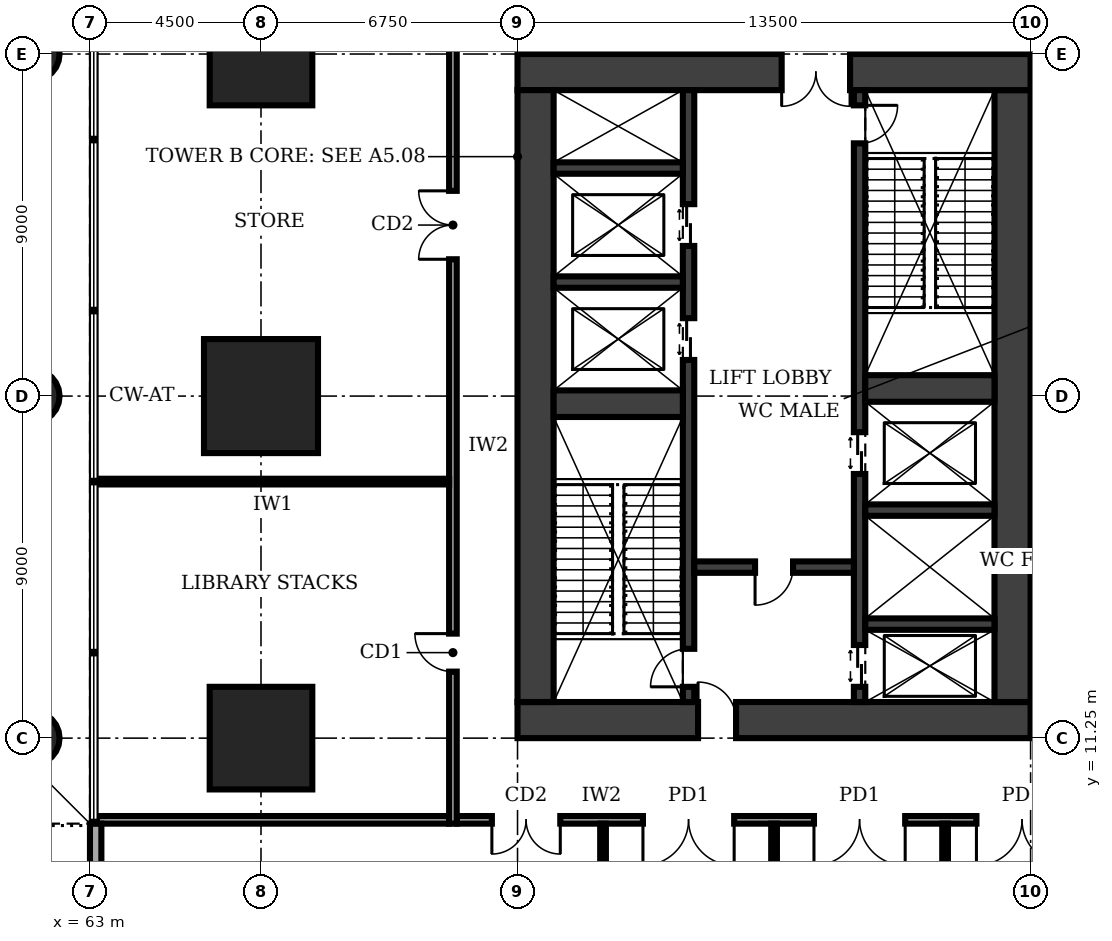
"""IFC4 building model, lengths in metres.
Left out: names, types, materials, properties, quantities, classifications, styles, units other than length and angle.
Written with IfcOpenShell. Run it as: python <this file> out.ifc"""

import sys

from ifc_helpers import new_model, si_unit, direction, frame, frame_2d, origin, origin_2d, place, context, subcontext, project, spatial, rectangle, circle, extrude, element, fill, save


model = new_model("IFC4")
c1 = context("Model", 3, precision=1e-05, world=origin(), true_north=direction((0.0, 1.0)))
c2 = subcontext(c1, "Body", "Model", "MODEL_VIEW")
j1 = project(units=[si_unit("LENGTHUNIT", "METRE"), si_unit("PLANEANGLEUNIT", "RADIAN")], contexts=[c1])
p1 = place(None, origin())
s1 = spatial("IfcSite", under=j1, at=p1, CompositionType="ELEMENT")
p2 = place(p1, origin())
s2 = spatial("IfcBuilding", under=s1, at=p2, CompositionType="ELEMENT")
p3 = place(p2, frame((0.0, 0.0, 16.0)))
s3 = spatial("IfcBuildingStorey", under=s2, at=p3, CompositionType="ELEMENT", Elevation=16.0)
p4 = place(p3, frame((74.25, 11.725, 0.0), z_axis=(0.0, 0.0, 1.0), x_axis=(1.0, 0.0, 0.0)))
e1 = element("IfcWall", 1, at=p4, inside=s3, PredefinedType="SHEAR", context=c2, shape_type="SweptSolid", body=[
    extrude(rectangle(XDim=13.5, YDim=0.95, at=frame_2d((6.75, 0.0))), origin(), (0.0, 0.0, 1.0), 5.0),
])
p5 = place(p4, frame((4.75, 0.0, 0.0)))
e2 = element("IfcOpeningElement", 2, at=p5, cuts=e1, PredefinedType="OPENING", context=c2, shape_type="SweptSolid", body=[
    extrude(rectangle(XDim=1.0, YDim=2.1, at=frame_2d((0.5, 1.05))), frame((0.0, 0.485, 0.0), z_axis=(0.0, -1.0, 0.0), x_axis=(1.0, 0.0, 0.0)), (0.0, 0.0, 1.0), 0.97),
])
p6 = place(p3, frame((87.275, 12.2, 0.0), z_axis=(0.0, 0.0, 1.0), x_axis=(0.0, 1.0, 0.0)))
e3 = element("IfcWall", 3, at=p6, inside=s3, PredefinedType="SHEAR", context=c2, shape_type="SweptSolid", body=[
    extrude(rectangle(XDim=16.1, YDim=0.95, at=frame_2d((8.05, 0.0))), origin(), (0.0, 0.0, 1.0), 5.0),
])
p7 = place(p3, frame((87.75, 28.775, 0.0), z_axis=(0.0, 0.0, 1.0), x_axis=(-1.0, 0.0, 0.0)))
e4 = element("IfcWall", 4, at=p7, inside=s3, PredefinedType="SHEAR", context=c2, shape_type="SweptSolid", body=[
    extrude(rectangle(XDim=13.5, YDim=0.95, at=frame_2d((6.75, 0.0))), origin(), (0.0, 0.0, 1.0), 5.0),
])
p8 = place(p7, frame((4.75, 0.0, 0.0)))
e5 = element("IfcOpeningElement", 5, at=p8, cuts=e4, PredefinedType="OPENING", context=c2, shape_type="SweptSolid", body=[
    extrude(rectangle(XDim=1.8, YDim=2.1, at=frame_2d((0.9, 1.05))), frame((0.0, 0.485, 0.0), z_axis=(0.0, -1.0, 0.0), x_axis=(1.0, 0.0, 0.0)), (0.0, 0.0, 1.0), 0.97),
])
p9 = place(p3, frame((74.725, 28.3, 0.0), z_axis=(0.0, 0.0, 1.0), x_axis=(0.0, -1.0, 0.0)))
e6 = element("IfcWall", 6, at=p9, inside=s3, PredefinedType="SHEAR", context=c2, shape_type="SweptSolid", body=[
    extrude(rectangle(XDim=16.1, YDim=0.95, at=frame_2d((8.05, 0.0))), origin(), (0.0, 0.0, 1.0), 5.0),
])
p10 = place(p3, frame((78.75, 12.2, 0.0), z_axis=(0.0, 0.0, 1.0), x_axis=(0.0, 1.0, 0.0)))
e7 = element("IfcWall", 7, at=p10, inside=s3, PredefinedType="SHEAR", context=c2, shape_type="SweptSolid", body=[
    extrude(rectangle(XDim=16.1, YDim=0.3, at=frame_2d((8.05, 0.0))), origin(), (0.0, 0.0, 1.0), 5.0),
])
p11 = place(p10, frame((0.4, 0.0, 0.0)))
e8 = element("IfcOpeningElement", 8, at=p11, cuts=e7, PredefinedType="OPENING", context=c2, shape_type="SweptSolid", body=[
    extrude(rectangle(XDim=1.0, YDim=2.1, at=frame_2d((0.5, 1.05))), frame((0.0, 0.16, 0.0), z_axis=(0.0, -1.0, 0.0), x_axis=(1.0, 0.0, 0.0)), (0.0, 0.0, 1.0), 0.32),
])
p12 = place(p10, frame((9.0, 0.0, 0.0)))
e9 = element("IfcOpeningElement", 9, at=p12, cuts=e7, PredefinedType="OPENING", context=c2, shape_type="SweptSolid", body=[
    extrude(rectangle(XDim=1.1, YDim=2.1, at=frame_2d((0.55, 1.05))), frame((0.0, 0.16, 0.0), z_axis=(0.0, -1.0, 0.0), x_axis=(1.0, 0.0, 0.0)), (0.0, 0.0, 1.0), 0.32),
])
p13 = place(p10, frame((12.0, 0.0, 0.0)))
e10 = element("IfcOpeningElement", 10, at=p13, cuts=e7, PredefinedType="OPENING", context=c2, shape_type="SweptSolid", body=[
    extrude(rectangle(XDim=1.1, YDim=2.1, at=frame_2d((0.55, 1.05))), frame((0.0, 0.16, 0.0), z_axis=(0.0, -1.0, 0.0), x_axis=(1.0, 0.0, 0.0)), (0.0, 0.0, 1.0), 0.32),
])
p14 = place(p3, frame((83.25, 12.2, 0.0), z_axis=(0.0, 0.0, 1.0), x_axis=(0.0, 1.0, 0.0)))
e11 = element("IfcWall", 11, at=p14, inside=s3, PredefinedType="SHEAR", context=c2, shape_type="SweptSolid", body=[
    extrude(rectangle(XDim=16.1, YDim=0.3, at=frame_2d((8.05, 0.0))), origin(), (0.0, 0.0, 1.0), 5.0),
])
p15 = place(p14, frame((14.7, 0.0, 0.0)))
e12 = element("IfcOpeningElement", 12, at=p15, cuts=e11, PredefinedType="OPENING", context=c2, shape_type="SweptSolid", body=[
    extrude(rectangle(XDim=1.0, YDim=2.1, at=frame_2d((0.5, 1.05))), frame((0.0, 0.16, 0.0), z_axis=(0.0, -1.0, 0.0), x_axis=(1.0, 0.0, 0.0)), (0.0, 0.0, 1.0), 0.32),
])
p16 = place(p14, frame((0.4, 0.0, 0.0)))
e13 = element("IfcOpeningElement", 13, at=p16, cuts=e11, PredefinedType="OPENING", context=c2, shape_type="SweptSolid", body=[
    extrude(rectangle(XDim=1.1, YDim=2.1, at=frame_2d((0.55, 1.05))), frame((0.0, 0.16, 0.0), z_axis=(0.0, -1.0, 0.0), x_axis=(1.0, 0.0, 0.0)), (0.0, 0.0, 1.0), 0.32),
])
p17 = place(p14, frame((6.0, 0.0, 0.0)))
e14 = element("IfcOpeningElement", 14, at=p17, cuts=e11, PredefinedType="OPENING", context=c2, shape_type="SweptSolid", body=[
    extrude(rectangle(XDim=1.1, YDim=2.1, at=frame_2d((0.55, 1.05))), frame((0.0, 0.16, 0.0), z_axis=(0.0, -1.0, 0.0), x_axis=(1.0, 0.0, 0.0)), (0.0, 0.0, 1.0), 0.32),
])
p18 = place(p3, frame((75.2, 20.05, 0.0), z_axis=(0.0, 0.0, 1.0), x_axis=(1.0, 0.0, 0.0)))
e15 = element("IfcWall", 15, at=p18, inside=s3, PredefinedType="SHEAR", context=c2, shape_type="SweptSolid", body=[
    extrude(rectangle(XDim=3.4, YDim=0.7, at=frame_2d((1.7, 0.0))), origin(), (0.0, 0.0, 1.0), 5.0),
])
p19 = place(p3, frame((78.9, 15.75, 0.0), z_axis=(0.0, 0.0, 1.0), x_axis=(1.0, 0.0, 0.0)))
e16 = element("IfcWall", 16, at=p19, inside=s3, PredefinedType="SHEAR", context=c2, shape_type="SweptSolid", body=[
    extrude(rectangle(XDim=4.2, YDim=0.3, at=frame_2d((2.1, 0.0))), origin(), (0.0, 0.0, 1.0), 5.0),
])
p20 = place(p19, frame((1.6, 0.0, 0.0)))
e17 = element("IfcOpeningElement", 17, at=p20, cuts=e16, PredefinedType="OPENING", context=c2, shape_type="SweptSolid", body=[
    extrude(rectangle(XDim=1.0, YDim=2.1, at=frame_2d((0.5, 1.05))), frame((0.0, 0.16, 0.0), z_axis=(0.0, -1.0, 0.0), x_axis=(1.0, 0.0, 0.0)), (0.0, 0.0, 1.0), 0.32),
])
for number, where, z_axis, x_axis in (
    (18, (83.4, 14.25, 0.0), (0.0, 0.0, 1.0), (1.0, 0.0, 0.0)),
    (19, (83.4, 17.25, 0.0), (0.0, 0.0, 1.0), (1.0, 0.0, 0.0)),
):
    element("IfcWall", number, at=place(p3, frame(where, z_axis=z_axis, x_axis=x_axis)), inside=s3, PredefinedType="SHEAR", context=c2, shape_type="SweptSolid", body=[
        extrude(rectangle(XDim=3.4, YDim=0.3, at=frame_2d((1.7, 0.0))), origin(), (0.0, 0.0, 1.0), 5.0),
    ])
p21 = place(p3, frame((83.4, 20.45, 0.0), z_axis=(0.0, 0.0, 1.0), x_axis=(1.0, 0.0, 0.0)))
e20 = element("IfcWall", 20, at=p21, inside=s3, PredefinedType="SHEAR", context=c2, shape_type="SweptSolid", body=[
    extrude(rectangle(XDim=3.4, YDim=0.7, at=frame_2d((1.7, 0.0))), origin(), (0.0, 0.0, 1.0), 5.0),
])
for number, where, z_axis, x_axis in (
    (21, (75.2, 23.25, 0.0), (0.0, 0.0, 1.0), (1.0, 0.0, 0.0)),
    (22, (75.2, 26.25, 0.0), (0.0, 0.0, 1.0), (1.0, 0.0, 0.0)),
):
    element("IfcWall", number, at=place(p3, frame(where, z_axis=z_axis, x_axis=x_axis)), inside=s3, PredefinedType="SHEAR", context=c2, shape_type="SweptSolid", body=[
        extrude(rectangle(XDim=3.4, YDim=0.3, at=frame_2d((1.7, 0.0))), origin(), (0.0, 0.0, 1.0), 5.0),
    ])
p22 = place(p3, frame((67.5, 11.25, 0.0), z_axis=(0.0, 0.0, 1.0), x_axis=(1.0, 0.0, 0.0)))
e23 = element("IfcColumn", 23, at=p22, inside=s3, PredefinedType="COLUMN", context=c2, shape_type="SweptSolid", body=[
    extrude(rectangle(XDim=2.7, YDim=2.7, at=origin_2d()), origin(), (0.0, 0.0, 1.0), 5.0),
])
p23 = place(p3, frame((67.5, 20.25, 0.0), z_axis=(0.0, 0.0, 1.0), x_axis=(1.0, 0.0, 0.0)))
e24 = element("IfcColumn", 24, at=p23, inside=s3, PredefinedType="COLUMN", context=c2, shape_type="SweptSolid", body=[
    extrude(rectangle(XDim=3.0, YDim=3.0, at=origin_2d()), origin(), (0.0, 0.0, 1.0), 5.0),
])
p24 = place(p3, frame((67.5, 29.25, 0.0), z_axis=(0.0, 0.0, 1.0), x_axis=(1.0, 0.0, 0.0)))
e25 = element("IfcColumn", 25, at=p24, inside=s3, PredefinedType="COLUMN", context=c2, shape_type="SweptSolid", body=[
    extrude(rectangle(XDim=2.7, YDim=2.7, at=origin_2d()), origin(), (0.0, 0.0, 1.0), 5.0),
])
for number, where, z_axis, x_axis in (
    (26, (61.5, 11.25, 0.0), (0.0, 0.0, 1.0), (1.0, 0.0, 0.0)),
    (27, (61.5, 20.25, 0.0), (0.0, 0.0, 1.0), (1.0, 0.0, 0.0)),
    (28, (61.5, 29.25, 0.0), (0.0, 0.0, 1.0), (1.0, 0.0, 0.0)),
):
    element("IfcColumn", number, at=place(p3, frame(where, z_axis=z_axis, x_axis=x_axis)), inside=s3, PredefinedType="COLUMN", context=c2, shape_type="SweptSolid", body=[
        extrude(circle(Radius=0.7, at=origin_2d()), origin(), (0.0, 0.0, 1.0), 5.0),
    ])
p25 = place(p3, frame((72.65, 9.1, 0.0), z_axis=(0.0, 0.0, 1.0), x_axis=(1.0, 0.0, 0.0)))
e29 = element("IfcWall", 29, at=p25, inside=s3, PredefinedType="SOLIDWALL", context=c2, shape_type="SweptSolid", body=[
    extrude(rectangle(XDim=16.9, YDim=0.2, at=frame_2d((8.45, 0.0))), origin(), (0.0, 0.0, 1.0), 4.7),
])
p26 = place(p25, frame((0.925, 0.0, 0.0)))
e30 = element("IfcOpeningElement", 30, at=p26, cuts=e29, PredefinedType="OPENING", context=c2, shape_type="SweptSolid", body=[
    extrude(rectangle(XDim=1.8, YDim=2.1, at=frame_2d((0.9, 1.05))), frame((0.0, 0.11, 0.0), z_axis=(0.0, -1.0, 0.0), x_axis=(1.0, 0.0, 0.0)), (0.0, 0.0, 1.0), 0.22),
])
p27 = place(p25, frame((4.9, 0.0, 0.0)))
e31 = element("IfcOpeningElement", 31, at=p27, cuts=e29, PredefinedType="OPENING", context=c2, shape_type="SweptSolid", body=[
    extrude(rectangle(XDim=2.4, YDim=2.7, at=frame_2d((1.2, 1.35))), frame((0.0, 0.11, 0.0), z_axis=(0.0, -1.0, 0.0), x_axis=(1.0, 0.0, 0.0)), (0.0, 0.0, 1.0), 0.22),
])
p28 = place(p25, frame((9.4, 0.0, 0.0)))
e32 = element("IfcOpeningElement", 32, at=p28, cuts=e29, PredefinedType="OPENING", context=c2, shape_type="SweptSolid", body=[
    extrude(rectangle(XDim=2.4, YDim=2.7, at=frame_2d((1.2, 1.35))), frame((0.0, 0.11, 0.0), z_axis=(0.0, -1.0, 0.0), x_axis=(1.0, 0.0, 0.0)), (0.0, 0.0, 1.0), 0.22),
])
p29 = place(p25, frame((13.675, 0.0, 0.0)))
e33 = element("IfcOpeningElement", 33, at=p29, cuts=e29, PredefinedType="OPENING", context=c2, shape_type="SweptSolid", body=[
    extrude(rectangle(XDim=2.4, YDim=2.7, at=frame_2d((1.2, 1.35))), frame((0.0, 0.11, 0.0), z_axis=(0.0, -1.0, 0.0), x_axis=(1.0, 0.0, 0.0)), (0.0, 0.0, 1.0), 0.22),
])
p30 = place(p3, frame((72.55, 31.3, 0.0), z_axis=(0.0, 0.0, 1.0), x_axis=(0.0, -1.0, 0.0)))
e34 = element("IfcWall", 34, at=p30, inside=s3, PredefinedType="SOLIDWALL", context=c2, shape_type="SweptSolid", body=[
    extrude(rectangle(XDim=22.3, YDim=0.2, at=frame_2d((11.15, 0.0))), origin(), (0.0, 0.0, 1.0), 4.7),
])
p31 = place(p30, frame((17.3, 0.0, 0.0)))
e35 = element("IfcOpeningElement", 35, at=p31, cuts=e34, PredefinedType="OPENING", context=c2, shape_type="SweptSolid", body=[
    extrude(rectangle(XDim=1.0, YDim=2.1, at=frame_2d((0.5, 1.05))), frame((0.0, 0.11, 0.0), z_axis=(0.0, -1.0, 0.0), x_axis=(1.0, 0.0, 0.0)), (0.0, 0.0, 1.0), 0.22),
])
p32 = place(p30, frame((5.65, 0.0, 0.0)))
e36 = element("IfcOpeningElement", 36, at=p32, cuts=e34, PredefinedType="OPENING", context=c2, shape_type="SweptSolid", body=[
    extrude(rectangle(XDim=1.8, YDim=2.1, at=frame_2d((0.9, 1.05))), frame((0.0, 0.11, 0.0), z_axis=(0.0, -1.0, 0.0), x_axis=(1.0, 0.0, 0.0)), (0.0, 0.0, 1.0), 0.22),
])
p33 = place(p3, frame((63.18, 9.1, 0.0), z_axis=(0.0, 0.0, 1.0), x_axis=(1.0, 0.0, 0.0)))
e37 = element("IfcWall", 37, at=p33, inside=s3, PredefinedType="SOLIDWALL", context=c2, shape_type="SweptSolid", body=[
    extrude(rectangle(XDim=9.27, YDim=0.2, at=frame_2d((4.635, 0.0))), origin(), (0.0, 0.0, 1.0), 4.7),
])
for number, where, z_axis, x_axis in (
    (38, (76.5, -4.2, 0.0), (0.0, 0.0, 1.0), (0.0, 1.0, 0.0)),
    (39, (81.0, -4.2, 0.0), (0.0, 0.0, 1.0), (0.0, 1.0, 0.0)),
    (40, (85.5, -4.2, 0.0), (0.0, 0.0, 1.0), (0.0, 1.0, 0.0)),
):
    element("IfcWall", number, at=place(p3, frame(where, z_axis=z_axis, x_axis=x_axis)), inside=s3, PredefinedType="PARTITIONING", context=c2, shape_type="SweptSolid", body=[
        extrude(rectangle(XDim=13.2, YDim=0.15, at=frame_2d((6.6, 0.0))), origin(), (0.0, 0.0, 1.0), 4.7),
    ])
p34 = place(p3, frame((63.18, 18.0, 0.0), z_axis=(0.0, 0.0, 1.0), x_axis=(1.0, 0.0, 0.0)))
e41 = element("IfcWall", 41, at=p34, inside=s3, PredefinedType="PARTITIONING", context=c2, shape_type="SweptSolid", body=[
    extrude(rectangle(XDim=9.27, YDim=0.15, at=frame_2d((4.635, 0.0))), origin(), (0.0, 0.0, 1.0), 4.7),
])
p35 = place(p3, frame((63.15, 4.97, 0.0), z_axis=(0.0, 0.0, 1.0), x_axis=(0.0, 1.0, 0.0)))
e42 = element("IfcWall", 42, at=p35, inside=s3, PredefinedType="SOLIDWALL", context=c2, shape_type="SweptSolid", body=[
    extrude(rectangle(XDim=4.03, YDim=0.3, at=frame_2d((2.015, 0.0))), origin(), (0.0, 0.0, 1.0), 4.7),
])
p36 = place(p5, origin())
e43 = element("IfcDoor", 43, at=p36, inside=s3, OperationType="SINGLE_SWING_LEFT", PredefinedType="DOOR", context=c2, shape_type="SweptSolid", body=[
    extrude(rectangle(XDim=1.0, YDim=2.1, at=frame_2d((0.5, 1.05))), frame((0.0, 0.025, 0.0), z_axis=(0.0, -1.0, 0.0), x_axis=(1.0, 0.0, 0.0)), (0.0, 0.0, 1.0), 0.05),
])
fill(e2, e43)
p37 = place(p8, origin())
e44 = element("IfcDoor", 44, at=p37, inside=s3, OperationType="DOUBLE_DOOR_SINGLE_SWING", PredefinedType="DOOR", context=c2, shape_type="SweptSolid", body=[
    extrude(rectangle(XDim=1.8, YDim=2.1, at=frame_2d((0.9, 1.05))), frame((0.0, 0.025, 0.0), z_axis=(0.0, -1.0, 0.0), x_axis=(1.0, 0.0, 0.0)), (0.0, 0.0, 1.0), 0.05),
])
fill(e5, e44)
p38 = place(p20, frame((1.0, 0.0, 0.0), z_axis=(0.0, 0.0, 1.0), x_axis=(-1.0, 0.0, 0.0)))
e45 = element("IfcDoor", 45, at=p38, inside=s3, OperationType="SINGLE_SWING_RIGHT", PredefinedType="DOOR", context=c2, shape_type="SweptSolid", body=[
    extrude(rectangle(XDim=1.0, YDim=2.1, at=frame_2d((0.5, 1.05))), frame((0.0, 0.025, 0.0), z_axis=(0.0, -1.0, 0.0), x_axis=(1.0, 0.0, 0.0)), (0.0, 0.0, 1.0), 0.05),
])
fill(e17, e45)
p39 = place(p11, origin())
e46 = element("IfcDoor", 46, at=p39, inside=s3, OperationType="SINGLE_SWING_LEFT", PredefinedType="DOOR", context=c2, shape_type="SweptSolid", body=[
    extrude(rectangle(XDim=1.0, YDim=2.1, at=frame_2d((0.5, 1.05))), frame((0.0, 0.025, 0.0), z_axis=(0.0, -1.0, 0.0), x_axis=(1.0, 0.0, 0.0)), (0.0, 0.0, 1.0), 0.05),
])
fill(e8, e46)
p40 = place(p15, frame((1.0, 0.0, 0.0), z_axis=(0.0, 0.0, 1.0), x_axis=(-1.0, 0.0, 0.0)))
e47 = element("IfcDoor", 47, at=p40, inside=s3, OperationType="SINGLE_SWING_LEFT", PredefinedType="DOOR", context=c2, shape_type="SweptSolid", body=[
    extrude(rectangle(XDim=1.0, YDim=2.1, at=frame_2d((0.5, 1.05))), frame((0.0, 0.025, 0.0), z_axis=(0.0, -1.0, 0.0), x_axis=(1.0, 0.0, 0.0)), (0.0, 0.0, 1.0), 0.05),
])
fill(e12, e47)
p41 = place(p16, origin())
e48 = element("IfcDoor", 48, at=p41, inside=s3, OperationType="DOUBLE_DOOR_SLIDING", PredefinedType="DOOR", context=c2, shape_type="SweptSolid", body=[
    extrude(rectangle(XDim=1.1, YDim=2.1, at=frame_2d((0.55, 1.05))), frame((0.0, 0.025, 0.0), z_axis=(0.0, -1.0, 0.0), x_axis=(1.0, 0.0, 0.0)), (0.0, 0.0, 1.0), 0.05),
])
fill(e13, e48)
p42 = place(p12, origin())
e49 = element("IfcDoor", 49, at=p42, inside=s3, OperationType="DOUBLE_DOOR_SLIDING", PredefinedType="DOOR", context=c2, shape_type="SweptSolid", body=[
    extrude(rectangle(XDim=1.1, YDim=2.1, at=frame_2d((0.55, 1.05))), frame((0.0, 0.025, 0.0), z_axis=(0.0, -1.0, 0.0), x_axis=(1.0, 0.0, 0.0)), (0.0, 0.0, 1.0), 0.05),
])
fill(e9, e49)
p43 = place(p13, origin())
e50 = element("IfcDoor", 50, at=p43, inside=s3, OperationType="DOUBLE_DOOR_SLIDING", PredefinedType="DOOR", context=c2, shape_type="SweptSolid", body=[
    extrude(rectangle(XDim=1.1, YDim=2.1, at=frame_2d((0.55, 1.05))), frame((0.0, 0.025, 0.0), z_axis=(0.0, -1.0, 0.0), x_axis=(1.0, 0.0, 0.0)), (0.0, 0.0, 1.0), 0.05),
])
fill(e10, e50)
p44 = place(p17, origin())
e51 = element("IfcDoor", 51, at=p44, inside=s3, OperationType="DOUBLE_DOOR_SLIDING", PredefinedType="DOOR", context=c2, shape_type="SweptSolid", body=[
    extrude(rectangle(XDim=1.1, YDim=2.1, at=frame_2d((0.55, 1.05))), frame((0.0, 0.025, 0.0), z_axis=(0.0, -1.0, 0.0), x_axis=(1.0, 0.0, 0.0)), (0.0, 0.0, 1.0), 0.05),
])
fill(e14, e51)
p45 = place(p26, frame((1.8, 0.0, 0.0), z_axis=(0.0, 0.0, 1.0), x_axis=(-1.0, 0.0, 0.0)))
e52 = element("IfcDoor", 52, at=p45, inside=s3, OperationType="DOUBLE_DOOR_SINGLE_SWING", PredefinedType="DOOR", context=c2, shape_type="SweptSolid", body=[
    extrude(rectangle(XDim=1.8, YDim=2.1, at=frame_2d((0.9, 1.05))), frame((0.0, 0.025, 0.0), z_axis=(0.0, -1.0, 0.0), x_axis=(1.0, 0.0, 0.0)), (0.0, 0.0, 1.0), 0.05),
])
fill(e30, e52)
p46 = place(p27, frame((2.4, 0.0, 0.0), z_axis=(0.0, 0.0, 1.0), x_axis=(-1.0, 0.0, 0.0)))
e53 = element("IfcDoor", 53, at=p46, inside=s3, OperationType="DOUBLE_DOOR_SINGLE_SWING", PredefinedType="DOOR", context=c2, shape_type="SweptSolid", body=[
    extrude(rectangle(XDim=2.4, YDim=2.7, at=frame_2d((1.2, 1.35))), frame((0.0, 0.025, 0.0), z_axis=(0.0, -1.0, 0.0), x_axis=(1.0, 0.0, 0.0)), (0.0, 0.0, 1.0), 0.05),
])
fill(e31, e53)
p47 = place(p28, frame((2.4, 0.0, 0.0), z_axis=(0.0, 0.0, 1.0), x_axis=(-1.0, 0.0, 0.0)))
e54 = element("IfcDoor", 54, at=p47, inside=s3, OperationType="DOUBLE_DOOR_SINGLE_SWING", PredefinedType="DOOR", context=c2, shape_type="SweptSolid", body=[
    extrude(rectangle(XDim=2.4, YDim=2.7, at=frame_2d((1.2, 1.35))), frame((0.0, 0.025, 0.0), z_axis=(0.0, -1.0, 0.0), x_axis=(1.0, 0.0, 0.0)), (0.0, 0.0, 1.0), 0.05),
])
fill(e32, e54)
p48 = place(p29, frame((2.4, 0.0, 0.0), z_axis=(0.0, 0.0, 1.0), x_axis=(-1.0, 0.0, 0.0)))
e55 = element("IfcDoor", 55, at=p48, inside=s3, OperationType="DOUBLE_DOOR_SINGLE_SWING", PredefinedType="DOOR", context=c2, shape_type="SweptSolid", body=[
    extrude(rectangle(XDim=2.4, YDim=2.7, at=frame_2d((1.2, 1.35))), frame((0.0, 0.025, 0.0), z_axis=(0.0, -1.0, 0.0), x_axis=(1.0, 0.0, 0.0)), (0.0, 0.0, 1.0), 0.05),
])
fill(e33, e55)
p49 = place(p31, frame((1.0, 0.0, 0.0), z_axis=(0.0, 0.0, 1.0), x_axis=(-1.0, 0.0, 0.0)))
e56 = element("IfcDoor", 56, at=p49, inside=s3, OperationType="SINGLE_SWING_RIGHT", PredefinedType="DOOR", context=c2, shape_type="SweptSolid", body=[
    extrude(rectangle(XDim=1.0, YDim=2.1, at=frame_2d((0.5, 1.05))), frame((0.0, 0.025, 0.0), z_axis=(0.0, -1.0, 0.0), x_axis=(1.0, 0.0, 0.0)), (0.0, 0.0, 1.0), 0.05),
])
fill(e35, e56)
p50 = place(p32, frame((1.8, 0.0, 0.0), z_axis=(0.0, 0.0, 1.0), x_axis=(-1.0, 0.0, 0.0)))
e57 = element("IfcDoor", 57, at=p50, inside=s3, OperationType="DOUBLE_DOOR_SINGLE_SWING", PredefinedType="DOOR", context=c2, shape_type="SweptSolid", body=[
    extrude(rectangle(XDim=1.8, YDim=2.1, at=frame_2d((0.9, 1.05))), frame((0.0, 0.025, 0.0), z_axis=(0.0, -1.0, 0.0), x_axis=(1.0, 0.0, 0.0)), (0.0, 0.0, 1.0), 0.05),
])
fill(e36, e57)
save(model, sys.argv[1])
